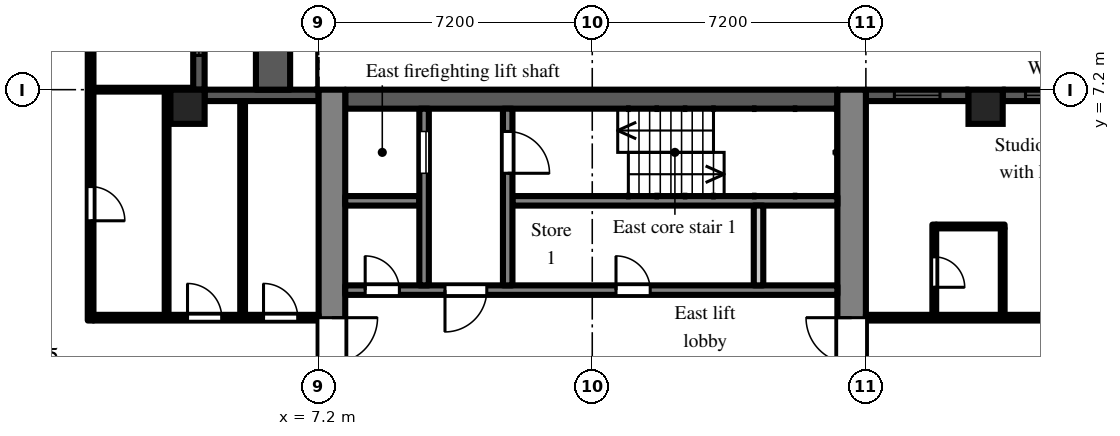
"""IFC4 building model, lengths in metres.
Left out: names, types, materials, properties, quantities, classifications, styles, units other than length and angle.
Written with IfcOpenShell. Run it as: python <this file> out.ifc"""

import sys

from ifc_helpers import new_model, si_unit, direction, frame, frame_2d, origin, origin_2d, place, context, subcontext, project, spatial, rectangle, extrude, element, fill, save


model = new_model("IFC4")
c1 = context("Model", 3, precision=1e-05, world=origin(), true_north=direction((0.0, 1.0)))
c2 = subcontext(c1, "Body", "Model", "MODEL_VIEW")
j1 = project(units=[si_unit("LENGTHUNIT", "METRE"), si_unit("PLANEANGLEUNIT", "RADIAN")], contexts=[c1])
p1 = place(None, origin())
s1 = spatial("IfcSite", under=j1, at=p1, CompositionType="ELEMENT")
p2 = place(p1, origin())
s2 = spatial("IfcBuilding", under=s1, at=p2, CompositionType="ELEMENT")
p3 = place(p2, frame((0.0, 0.0, 93.9)))
s3 = spatial("IfcBuildingStorey", under=s2, at=p3, CompositionType="ELEMENT", Elevation=93.9)
for number, where, z_axis, x_axis in (
    (1, (3.75, 6.75, 0.0), (0.0, 0.0, 1.0), (1.0, 0.0, 0.0)),
    (2, (24.75, 6.75, 0.0), (0.0, 0.0, 1.0), (1.0, 0.0, 0.0)),
):
    element("IfcColumn", number, at=place(p3, frame(where, z_axis=z_axis, x_axis=x_axis)), inside=s3, PredefinedType="COLUMN", context=c2, shape_type="SweptSolid", body=[
        extrude(rectangle(XDim=0.9, YDim=0.9, at=origin_2d()), origin(), (0.0, 0.0, 1.0), 3.0),
    ])
p4 = place(p3, frame((28.35, 7.05, 0.0), z_axis=(0.0, 0.0, 1.0), x_axis=(-1.0, 0.0, 0.0)))
e3 = element("IfcWall", 3, at=p4, inside=s3, PredefinedType="SOLIDWALL", context=c2, shape_type="SweptSolid", body=[
    extrude(rectangle(XDim=3.15, YDim=0.3, at=frame_2d((1.575, 0.0))), origin(), (0.0, 0.0, 1.0), 2.1),
])
p5 = place(p4, frame((0.15, 0.0, 0.2)))
e4 = element("IfcOpeningElement", 4, at=p5, cuts=e3, PredefinedType="OPENING", context=c2, shape_type="SweptSolid", body=[
    extrude(rectangle(XDim=2.4, YDim=1.85, at=frame_2d((1.2, 0.925))), frame((0.0, 0.16, 0.0), z_axis=(0.0, -1.0, 0.0), x_axis=(1.0, 0.0, 0.0)), (0.0, 0.0, 1.0), 0.32),
])
p6 = place(p3, frame((24.3, 7.05, 0.0), z_axis=(0.0, 0.0, 1.0), x_axis=(-1.0, 0.0, 0.0)))
e5 = element("IfcWall", 5, at=p6, inside=s3, PredefinedType="SOLIDWALL", context=c2, shape_type="SweptSolid", body=[
    extrude(rectangle(XDim=2.7, YDim=0.3, at=frame_2d((1.35, 0.0))), origin(), (0.0, 0.0, 1.0), 2.1),
])
p7 = place(p6, frame((0.75, 0.0, 0.2)))
e6 = element("IfcOpeningElement", 6, at=p7, cuts=e5, PredefinedType="OPENING", context=c2, shape_type="SweptSolid", body=[
    extrude(rectangle(XDim=1.2, YDim=1.85, at=frame_2d((0.6, 0.925))), frame((0.0, 0.16, 0.0), z_axis=(0.0, -1.0, 0.0), x_axis=(1.0, 0.0, 0.0)), (0.0, 0.0, 1.0), 0.32),
])
p8 = place(p3, frame((7.2, 7.05, 0.0), z_axis=(0.0, 0.0, 1.0), x_axis=(-1.0, 0.0, 0.0)))
e7 = element("IfcWall", 7, at=p8, inside=s3, PredefinedType="SOLIDWALL", context=c2, shape_type="SweptSolid", body=[
    extrude(rectangle(XDim=3.0, YDim=0.3, at=frame_2d((1.5, 0.0))), origin(), (0.0, 0.0, 1.0), 2.1),
])
p9 = place(p3, frame((4.05, 7.2, 0.0), z_axis=(0.0, 0.0, 1.0), x_axis=(0.0, 1.0, 0.0)))
e8 = element("IfcWall", 8, at=p9, inside=s3, PredefinedType="SOLIDWALL", context=c2, shape_type="SweptSolid", body=[
    extrude(rectangle(XDim=7.2, YDim=0.3, at=frame_2d((3.6, 0.0))), origin(), (0.0, 0.0, 1.0), 2.1),
])
p10 = place(p9, frame((3.0, 0.0, 0.0)))
e9 = element("IfcOpeningElement", 9, at=p10, cuts=e8, PredefinedType="OPENING", context=c2, shape_type="SweptSolid", body=[
    extrude(rectangle(XDim=1.2, YDim=2.05, at=frame_2d((0.6, 1.025))), frame((0.0, 0.16, 0.0), z_axis=(0.0, -1.0, 0.0), x_axis=(1.0, 0.0, 0.0)), (0.0, 0.0, 1.0), 0.32),
])
p11 = place(p9, frame((0.9, 0.0, 0.2)))
e10 = element("IfcOpeningElement", 10, at=p11, cuts=e8, PredefinedType="OPENING", context=c2, shape_type="SweptSolid", body=[
    extrude(rectangle(XDim=1.8, YDim=1.85, at=frame_2d((0.9, 0.925))), frame((0.0, 0.16, 0.0), z_axis=(0.0, -1.0, 0.0), x_axis=(1.0, 0.0, 0.0)), (0.0, 0.0, 1.0), 0.32),
])
p12 = place(p9, frame((4.5, 0.0, 0.2)))
e11 = element("IfcOpeningElement", 11, at=p12, cuts=e8, PredefinedType="OPENING", context=c2, shape_type="SweptSolid", body=[
    extrude(rectangle(XDim=1.8, YDim=1.85, at=frame_2d((0.9, 0.925))), frame((0.0, 0.16, 0.0), z_axis=(0.0, -1.0, 0.0), x_axis=(1.0, 0.0, 0.0)), (0.0, 0.0, 1.0), 0.32),
])
p13 = place(p3, frame((6.0, 7.2, 0.0), z_axis=(0.0, 0.0, 1.0), x_axis=(0.0, 1.0, 0.0)))
e12 = element("IfcWall", 12, at=p13, inside=s3, PredefinedType="PARAPET", context=c2, shape_type="SweptSolid", body=[
    extrude(rectangle(XDim=7.2, YDim=0.9, at=frame_2d((3.6, 0.0))), origin(), (0.0, 0.0, 1.0), 0.8),
])
p14 = place(p3, frame((7.55, -7.2, 0.0), z_axis=(0.0, 0.0, 1.0), x_axis=(0.0, 1.0, 0.0)))
e13 = element("IfcWall", 13, at=p14, inside=s3, PredefinedType="SHEAR", context=c2, shape_type="SweptSolid", body=[
    extrude(rectangle(XDim=14.4, YDim=0.7, at=frame_2d((7.2, 0.0))), origin(), (0.0, 0.0, 1.0), 2.575),
])
p15 = place(p14, frame((6.0, 0.0, 0.0)))
e14 = element("IfcOpeningElement", 14, at=p15, cuts=e13, PredefinedType="OPENING", context=c2, shape_type="SweptSolid", body=[
    extrude(rectangle(XDim=2.4, YDim=2.2, at=frame_2d((1.2, 1.1))), frame((0.0, 0.36, 0.0), z_axis=(0.0, -1.0, 0.0), x_axis=(1.0, 0.0, 0.0)), (0.0, 0.0, 1.0), 0.72),
])
p16 = place(p3, frame((21.225, -7.2, 0.0), z_axis=(0.0, 0.0, 1.0), x_axis=(0.0, 1.0, 0.0)))
e15 = element("IfcWall", 15, at=p16, inside=s3, PredefinedType="SHEAR", context=c2, shape_type="SweptSolid", body=[
    extrude(rectangle(XDim=14.4, YDim=0.75, at=frame_2d((7.2, 0.0))), origin(), (0.0, 0.0, 1.0), 2.575),
])
p17 = place(p16, frame((6.0, 0.0, 0.0)))
e16 = element("IfcOpeningElement", 16, at=p17, cuts=e15, PredefinedType="OPENING", context=c2, shape_type="SweptSolid", body=[
    extrude(rectangle(XDim=2.4, YDim=2.2, at=frame_2d((1.2, 1.1))), frame((0.0, 0.385, 0.0), z_axis=(0.0, -1.0, 0.0), x_axis=(1.0, 0.0, 0.0)), (0.0, 0.0, 1.0), 0.77),
])
p18 = place(p3, frame((7.9, 6.95, 0.0), z_axis=(0.0, 0.0, 1.0), x_axis=(1.0, 0.0, 0.0)))
e17 = element("IfcWall", 17, at=p18, inside=s3, PredefinedType="SHEAR", context=c2, shape_type="SweptSolid", body=[
    extrude(rectangle(XDim=12.95, YDim=0.5, at=frame_2d((6.475, 0.0))), origin(), (0.0, 0.0, 1.0), 2.575),
])
p19 = place(p3, frame((7.9, 1.925, 0.0), z_axis=(0.0, 0.0, 1.0), x_axis=(1.0, 0.0, 0.0)))
e18 = element("IfcWall", 18, at=p19, inside=s3, PredefinedType="SHEAR", context=c2, shape_type="SweptSolid", body=[
    extrude(rectangle(XDim=12.95, YDim=0.25, at=frame_2d((6.475, 0.0))), origin(), (0.0, 0.0, 1.0), 2.575),
])
p20 = place(p19, frame((0.525, 0.0, 0.0)))
e19 = element("IfcOpeningElement", 19, at=p20, cuts=e18, PredefinedType="OPENING", context=c2, shape_type="SweptSolid", body=[
    extrude(rectangle(XDim=0.9, YDim=2.1, at=frame_2d((0.45, 1.05))), frame((0.0, 0.135, 0.0), z_axis=(0.0, -1.0, 0.0), x_axis=(1.0, 0.0, 0.0)), (0.0, 0.0, 1.0), 0.27),
])
p21 = place(p19, frame((2.625, 0.0, 0.0)))
e20 = element("IfcOpeningElement", 20, at=p21, cuts=e18, PredefinedType="OPENING", context=c2, shape_type="SweptSolid", body=[
    extrude(rectangle(XDim=1.1, YDim=2.1, at=frame_2d((0.55, 1.05))), frame((0.0, 0.135, 0.0), z_axis=(0.0, -1.0, 0.0), x_axis=(1.0, 0.0, 0.0)), (0.0, 0.0, 1.0), 0.27),
])
p22 = place(p19, frame((7.125, 0.0, 0.0)))
e21 = element("IfcOpeningElement", 21, at=p22, cuts=e18, PredefinedType="OPENING", context=c2, shape_type="SweptSolid", body=[
    extrude(rectangle(XDim=0.9, YDim=2.1, at=frame_2d((0.45, 1.05))), frame((0.0, 0.135, 0.0), z_axis=(0.0, -1.0, 0.0), x_axis=(1.0, 0.0, 0.0)), (0.0, 0.0, 1.0), 0.27),
])
p23 = place(p3, frame((7.9, 4.275, 0.0), z_axis=(0.0, 0.0, 1.0), x_axis=(1.0, 0.0, 0.0)))
e22 = element("IfcWall", 22, at=p23, inside=s3, PredefinedType="SHEAR", context=c2, shape_type="SweptSolid", body=[
    extrude(rectangle(XDim=1.95, YDim=0.25, at=frame_2d((0.975, 0.0))), origin(), (0.0, 0.0, 1.0), 2.575),
])
p24 = place(p3, frame((12.3, 4.275, 0.0), z_axis=(0.0, 0.0, 1.0), x_axis=(1.0, 0.0, 0.0)))
e23 = element("IfcWall", 23, at=p24, inside=s3, PredefinedType="SHEAR", context=c2, shape_type="SweptSolid", body=[
    extrude(rectangle(XDim=8.55, YDim=0.25, at=frame_2d((4.275, 0.0))), origin(), (0.0, 0.0, 1.0), 2.575),
])
p25 = place(p3, frame((9.975, 2.05, 0.0), z_axis=(0.0, 0.0, 1.0), x_axis=(0.0, 1.0, 0.0)))
e24 = element("IfcWall", 24, at=p25, inside=s3, PredefinedType="SHEAR", context=c2, shape_type="SweptSolid", body=[
    extrude(rectangle(XDim=4.65, YDim=0.25, at=frame_2d((2.325, 0.0))), origin(), (0.0, 0.0, 1.0), 2.575),
])
p26 = place(p25, frame((2.95, 0.0, 0.0)))
e25 = element("IfcOpeningElement", 25, at=p26, cuts=e24, PredefinedType="OPENING", context=c2, shape_type="SweptSolid", body=[
    extrude(rectangle(XDim=1.1, YDim=2.1, at=frame_2d((0.55, 1.05))), frame((0.0, 0.135, 0.0), z_axis=(0.0, -1.0, 0.0), x_axis=(1.0, 0.0, 0.0)), (0.0, 0.0, 1.0), 0.27),
])
p27 = place(p3, frame((12.175, 2.05, 0.0), z_axis=(0.0, 0.0, 1.0), x_axis=(0.0, 1.0, 0.0)))
e26 = element("IfcWall", 26, at=p27, inside=s3, PredefinedType="SHEAR", context=c2, shape_type="SweptSolid", body=[
    extrude(rectangle(XDim=4.65, YDim=0.25, at=frame_2d((2.325, 0.0))), origin(), (0.0, 0.0, 1.0), 2.575),
])
p28 = place(p27, frame((2.95, 0.0, 0.0)))
e27 = element("IfcOpeningElement", 27, at=p28, cuts=e26, PredefinedType="OPENING", context=c2, shape_type="SweptSolid", body=[
    extrude(rectangle(XDim=1.1, YDim=2.1, at=frame_2d((0.55, 1.05))), frame((0.0, 0.135, 0.0), z_axis=(0.0, -1.0, 0.0), x_axis=(1.0, 0.0, 0.0)), (0.0, 0.0, 1.0), 0.27),
])
p29 = place(p3, frame((18.775, 2.05, 0.0), z_axis=(0.0, 0.0, 1.0), x_axis=(0.0, 1.0, 0.0)))
e28 = element("IfcWall", 28, at=p29, inside=s3, PredefinedType="PARTITIONING", context=c2, shape_type="SweptSolid", body=[
    extrude(rectangle(XDim=2.1, YDim=0.25, at=frame_2d((1.05, 0.0))), origin(), (0.0, 0.0, 1.0), 2.575),
])
p30 = place(p3, frame((1.2, 1.125, 0.0), z_axis=(0.0, 0.0, 1.0), x_axis=(0.0, 1.0, 0.0)))
e29 = element("IfcWall", 29, at=p30, inside=s3, PredefinedType="PARTITIONING", context=c2, shape_type="SweptSolid", body=[
    extrude(rectangle(XDim=20.175, YDim=0.15, at=frame_2d((10.087, 0.0))), origin(), (0.0, 0.0, 1.0), 2.575),
])
p31 = place(p30, frame((2.625, 0.0, 0.0)))
e30 = element("IfcOpeningElement", 30, at=p31, cuts=e29, PredefinedType="OPENING", context=c2, shape_type="SweptSolid", body=[
    extrude(rectangle(XDim=0.9, YDim=2.1, at=frame_2d((0.45, 1.05))), frame((0.0, 0.085, 0.0), z_axis=(0.0, -1.0, 0.0), x_axis=(1.0, 0.0, 0.0)), (0.0, 0.0, 1.0), 0.17),
])
p32 = place(p30, frame((7.425, 0.0, 0.0)))
e31 = element("IfcOpeningElement", 31, at=p32, cuts=e29, PredefinedType="OPENING", context=c2, shape_type="SweptSolid", body=[
    extrude(rectangle(XDim=0.9, YDim=2.1, at=frame_2d((0.45, 1.05))), frame((0.0, 0.085, 0.0), z_axis=(0.0, -1.0, 0.0), x_axis=(1.0, 0.0, 0.0)), (0.0, 0.0, 1.0), 0.17),
])
p33 = place(p30, frame((13.725, 0.0, 0.0)))
e32 = element("IfcOpeningElement", 32, at=p33, cuts=e29, PredefinedType="OPENING", context=c2, shape_type="SweptSolid", body=[
    extrude(rectangle(XDim=0.9, YDim=2.1, at=frame_2d((0.45, 1.05))), frame((0.0, 0.085, 0.0), z_axis=(0.0, -1.0, 0.0), x_axis=(1.0, 0.0, 0.0)), (0.0, 0.0, 1.0), 0.17),
])
p34 = place(p30, frame((15.525, 0.0, 0.0)))
e33 = element("IfcOpeningElement", 33, at=p34, cuts=e29, PredefinedType="OPENING", context=c2, shape_type="SweptSolid", body=[
    extrude(rectangle(XDim=0.9, YDim=2.1, at=frame_2d((0.45, 1.05))), frame((0.0, 0.085, 0.0), z_axis=(0.0, -1.0, 0.0), x_axis=(1.0, 0.0, 0.0)), (0.0, 0.0, 1.0), 0.17),
])
p35 = place(p30, frame((18.075, 0.0, 0.0)))
e34 = element("IfcOpeningElement", 34, at=p35, cuts=e29, PredefinedType="OPENING", context=c2, shape_type="SweptSolid", body=[
    extrude(rectangle(XDim=0.9, YDim=2.1, at=frame_2d((0.45, 1.05))), frame((0.0, 0.085, 0.0), z_axis=(0.0, -1.0, 0.0), x_axis=(1.0, 0.0, 0.0)), (0.0, 0.0, 1.0), 0.17),
])
p36 = place(p3, frame((1.275, 1.2, 0.0), z_axis=(0.0, 0.0, 1.0), x_axis=(1.0, 0.0, 0.0)))
e35 = element("IfcWall", 35, at=p36, inside=s3, PredefinedType="PARTITIONING", context=c2, shape_type="SweptSolid", body=[
    extrude(rectangle(XDim=5.925, YDim=0.15, at=frame_2d((2.962, 0.0))), origin(), (0.0, 0.0, 1.0), 2.575),
])
p37 = place(p36, frame((2.475, 0.0, 0.0)))
e36 = element("IfcOpeningElement", 36, at=p37, cuts=e35, PredefinedType="OPENING", context=c2, shape_type="SweptSolid", body=[
    extrude(rectangle(XDim=0.9, YDim=2.1, at=frame_2d((0.45, 1.05))), frame((0.0, 0.085, 0.0), z_axis=(0.0, -1.0, 0.0), x_axis=(1.0, 0.0, 0.0)), (0.0, 0.0, 1.0), 0.17),
])
p38 = place(p36, frame((4.475, 0.0, 0.0)))
e37 = element("IfcOpeningElement", 37, at=p38, cuts=e35, PredefinedType="OPENING", context=c2, shape_type="SweptSolid", body=[
    extrude(rectangle(XDim=0.9, YDim=2.1, at=frame_2d((0.45, 1.05))), frame((0.0, 0.085, 0.0), z_axis=(0.0, -1.0, 0.0), x_axis=(1.0, 0.0, 0.0)), (0.0, 0.0, 1.0), 0.17),
])
p39 = place(p3, frame((1.275, 7.2, 0.0), z_axis=(0.0, 0.0, 1.0), x_axis=(1.0, 0.0, 0.0)))
e38 = element("IfcWall", 38, at=p39, inside=s3, PredefinedType="PARTITIONING", context=c2, shape_type="SweptSolid", body=[
    extrude(rectangle(XDim=2.625, YDim=0.1, at=frame_2d((1.312, 0.0))), origin(), (0.0, 0.0, 1.0), 2.575),
])
p40 = place(p3, frame((3.2, 1.275, 0.0), z_axis=(0.0, 0.0, 1.0), x_axis=(0.0, 1.0, 0.0)))
e39 = element("IfcWall", 39, at=p40, inside=s3, PredefinedType="PARTITIONING", context=c2, shape_type="SweptSolid", body=[
    extrude(rectangle(XDim=5.875, YDim=0.1, at=frame_2d((2.938, 0.0))), origin(), (0.0, 0.0, 1.0), 2.575),
])
p41 = place(p3, frame((5.2, 1.275, 0.0), z_axis=(0.0, 0.0, 1.0), x_axis=(0.0, 1.0, 0.0)))
e40 = element("IfcWall", 40, at=p41, inside=s3, PredefinedType="PARTITIONING", context=c2, shape_type="SweptSolid", body=[
    extrude(rectangle(XDim=5.625, YDim=0.125, at=frame_2d((2.812, 0.0))), origin(), (0.0, 0.0, 1.0), 2.575),
])
p42 = place(p3, frame((21.6, 1.2, 0.0), z_axis=(0.0, 0.0, 1.0), x_axis=(1.0, 0.0, 0.0)))
e41 = element("IfcWall", 41, at=p42, inside=s3, PredefinedType="PARTITIONING", context=c2, shape_type="SweptSolid", body=[
    extrude(rectangle(XDim=14.9, YDim=0.15, at=frame_2d((7.45, 0.0))), origin(), (0.0, 0.0, 1.0), 2.575),
])
p43 = place(p42, frame((6.0, 0.0, 0.0)))
e42 = element("IfcOpeningElement", 42, at=p43, cuts=e41, PredefinedType="OPENING", context=c2, shape_type="SweptSolid", body=[
    extrude(rectangle(XDim=1.0, YDim=2.1, at=frame_2d((0.5, 1.05))), frame((0.0, 0.085, 0.0), z_axis=(0.0, -1.0, 0.0), x_axis=(1.0, 0.0, 0.0)), (0.0, 0.0, 1.0), 0.17),
])
p44 = place(p42, frame((7.65, 0.0, 0.0)))
e43 = element("IfcOpeningElement", 43, at=p44, cuts=e41, PredefinedType="OPENING", context=c2, shape_type="SweptSolid", body=[
    extrude(rectangle(XDim=0.9, YDim=2.1, at=frame_2d((0.45, 1.05))), frame((0.0, 0.085, 0.0), z_axis=(0.0, -1.0, 0.0), x_axis=(1.0, 0.0, 0.0)), (0.0, 0.0, 1.0), 0.17),
])
p45 = place(p42, frame((9.45, 0.0, 0.0)))
e44 = element("IfcOpeningElement", 44, at=p45, cuts=e41, PredefinedType="OPENING", context=c2, shape_type="SweptSolid", body=[
    extrude(rectangle(XDim=0.9, YDim=2.1, at=frame_2d((0.45, 1.05))), frame((0.0, 0.085, 0.0), z_axis=(0.0, -1.0, 0.0), x_axis=(1.0, 0.0, 0.0)), (0.0, 0.0, 1.0), 0.17),
])
p46 = place(p42, frame((11.95, 0.0, 0.0)))
e45 = element("IfcOpeningElement", 45, at=p46, cuts=e41, PredefinedType="OPENING", context=c2, shape_type="SweptSolid", body=[
    extrude(rectangle(XDim=1.8, YDim=2.1, at=frame_2d((0.9, 1.05))), frame((0.0, 0.085, 0.0), z_axis=(0.0, -1.0, 0.0), x_axis=(1.0, 0.0, 0.0)), (0.0, 0.0, 1.0), 0.17),
])
p47 = place(p3, frame((23.4, 1.275, 0.0), z_axis=(0.0, 0.0, 1.0), x_axis=(0.0, 1.0, 0.0)))
e46 = element("IfcWall", 46, at=p47, inside=s3, PredefinedType="PARTITIONING", context=c2, shape_type="SweptSolid", body=[
    extrude(rectangle(XDim=2.375, YDim=0.1, at=frame_2d((1.188, 0.0))), origin(), (0.0, 0.0, 1.0), 2.575),
])
p48 = place(p47, frame((0.725, 0.0, 0.0)))
e47 = element("IfcOpeningElement", 47, at=p48, cuts=e46, PredefinedType="OPENING", context=c2, shape_type="SweptSolid", body=[
    extrude(rectangle(XDim=0.8, YDim=2.1, at=frame_2d((0.4, 1.05))), frame((0.0, 0.06, 0.0), z_axis=(0.0, -1.0, 0.0), x_axis=(1.0, 0.0, 0.0)), (0.0, 0.0, 1.0), 0.12),
])
p49 = place(p3, frame((23.45, 3.6, 0.0), z_axis=(0.0, 0.0, 1.0), x_axis=(1.0, 0.0, 0.0)))
e48 = element("IfcWall", 48, at=p49, inside=s3, PredefinedType="PARTITIONING", context=c2, shape_type="SweptSolid", body=[
    extrude(rectangle(XDim=1.8, YDim=0.1, at=frame_2d((0.9, 0.0))), origin(), (0.0, 0.0, 1.0), 2.575),
])
p50 = place(p3, frame((25.2, 1.275, 0.0), z_axis=(0.0, 0.0, 1.0), x_axis=(0.0, 1.0, 0.0)))
e49 = element("IfcWall", 49, at=p50, inside=s3, PredefinedType="PARTITIONING", context=c2, shape_type="SweptSolid", body=[
    extrude(rectangle(XDim=2.275, YDim=0.1, at=frame_2d((1.138, 0.0))), origin(), (0.0, 0.0, 1.0), 2.575),
])
p51 = place(p5, origin())
e50 = element("IfcWindow", 50, at=p51, inside=s3, PartitioningType="SINGLE_PANEL", PredefinedType="WINDOW", context=c2, shape_type="SweptSolid", body=[
    extrude(rectangle(XDim=2.4, YDim=1.85, at=frame_2d((1.2, 0.925))), frame((0.0, 0.03, 0.0), z_axis=(0.0, -1.0, 0.0), x_axis=(1.0, 0.0, 0.0)), (0.0, 0.0, 1.0), 0.06),
])
fill(e4, e50)
p52 = place(p7, origin())
e51 = element("IfcWindow", 51, at=p52, inside=s3, PartitioningType="SINGLE_PANEL", PredefinedType="WINDOW", context=c2, shape_type="SweptSolid", body=[
    extrude(rectangle(XDim=1.2, YDim=1.85, at=frame_2d((0.6, 0.925))), frame((0.0, 0.03, 0.0), z_axis=(0.0, -1.0, 0.0), x_axis=(1.0, 0.0, 0.0)), (0.0, 0.0, 1.0), 0.06),
])
fill(e6, e51)
p53 = place(p11, origin())
e52 = element("IfcWindow", 52, at=p53, inside=s3, PartitioningType="SINGLE_PANEL", PredefinedType="WINDOW", context=c2, shape_type="SweptSolid", body=[
    extrude(rectangle(XDim=1.8, YDim=1.85, at=frame_2d((0.9, 0.925))), frame((0.0, 0.03, 0.0), z_axis=(0.0, -1.0, 0.0), x_axis=(1.0, 0.0, 0.0)), (0.0, 0.0, 1.0), 0.06),
])
fill(e10, e52)
p54 = place(p26, origin())
e53 = element("IfcDoor", 53, at=p54, inside=s3, OperationType="SLIDING_TO_LEFT", PredefinedType="DOOR", context=c2, shape_type="SweptSolid", body=[
    extrude(rectangle(XDim=1.1, YDim=2.1, at=frame_2d((0.55, 1.05))), frame((0.0, 0.025, 0.0), z_axis=(0.0, -1.0, 0.0), x_axis=(1.0, 0.0, 0.0)), (0.0, 0.0, 1.0), 0.05),
])
fill(e25, e53)
p55 = place(p28, frame((1.1, 0.0, 0.0), z_axis=(0.0, 0.0, 1.0), x_axis=(-1.0, 0.0, 0.0)))
e54 = element("IfcDoor", 54, at=p55, inside=s3, OperationType="SINGLE_SWING_RIGHT", PredefinedType="DOOR", context=c2, shape_type="SweptSolid", body=[
    extrude(rectangle(XDim=1.1, YDim=2.1, at=frame_2d((0.55, 1.05))), frame((0.0, 0.025, 0.0), z_axis=(0.0, -1.0, 0.0), x_axis=(1.0, 0.0, 0.0)), (0.0, 0.0, 1.0), 0.05),
])
fill(e27, e54)
p56 = place(p20, origin())
e55 = element("IfcDoor", 55, at=p56, inside=s3, OperationType="SINGLE_SWING_LEFT", PredefinedType="DOOR", context=c2, shape_type="SweptSolid", body=[
    extrude(rectangle(XDim=0.9, YDim=2.1, at=frame_2d((0.45, 1.05))), frame((0.0, 0.025, 0.0), z_axis=(0.0, -1.0, 0.0), x_axis=(1.0, 0.0, 0.0)), (0.0, 0.0, 1.0), 0.05),
])
fill(e19, e55)
p57 = place(p21, frame((1.1, 0.0, 0.0), z_axis=(0.0, 0.0, 1.0), x_axis=(-1.0, 0.0, 0.0)))
e56 = element("IfcDoor", 56, at=p57, inside=s3, OperationType="SINGLE_SWING_RIGHT", PredefinedType="DOOR", context=c2, shape_type="SweptSolid", body=[
    extrude(rectangle(XDim=1.1, YDim=2.1, at=frame_2d((0.55, 1.05))), frame((0.0, 0.025, 0.0), z_axis=(0.0, -1.0, 0.0), x_axis=(1.0, 0.0, 0.0)), (0.0, 0.0, 1.0), 0.05),
])
fill(e20, e56)
p58 = place(p15, frame((2.4, 0.0, 0.0), z_axis=(0.0, 0.0, 1.0), x_axis=(-1.0, 0.0, 0.0)))
e57 = element("IfcDoor", 57, at=p58, inside=s3, OperationType="DOUBLE_DOOR_DOUBLE_SWING", PredefinedType="DOOR", context=c2, shape_type="SweptSolid", body=[
    extrude(rectangle(XDim=2.4, YDim=2.2, at=frame_2d((1.2, 1.1))), frame((0.0, 0.025, 0.0), z_axis=(0.0, -1.0, 0.0), x_axis=(1.0, 0.0, 0.0)), (0.0, 0.0, 1.0), 0.05),
])
fill(e14, e57)
p59 = place(p17, origin())
e58 = element("IfcDoor", 58, at=p59, inside=s3, OperationType="DOUBLE_DOOR_DOUBLE_SWING", PredefinedType="DOOR", context=c2, shape_type="SweptSolid", body=[
    extrude(rectangle(XDim=2.4, YDim=2.2, at=frame_2d((1.2, 1.1))), frame((0.0, 0.025, 0.0), z_axis=(0.0, -1.0, 0.0), x_axis=(1.0, 0.0, 0.0)), (0.0, 0.0, 1.0), 0.05),
])
fill(e16, e58)
p60 = place(p22, origin())
e59 = element("IfcDoor", 59, at=p60, inside=s3, OperationType="SINGLE_SWING_LEFT", PredefinedType="DOOR", context=c2, shape_type="SweptSolid", body=[
    extrude(rectangle(XDim=0.9, YDim=2.1, at=frame_2d((0.45, 1.05))), frame((0.0, 0.025, 0.0), z_axis=(0.0, -1.0, 0.0), x_axis=(1.0, 0.0, 0.0)), (0.0, 0.0, 1.0), 0.05),
])
fill(e21, e59)
p61 = place(p31, frame((0.9, 0.0, 0.0), z_axis=(0.0, 0.0, 1.0), x_axis=(-1.0, 0.0, 0.0)))
e60 = element("IfcDoor", 60, at=p61, inside=s3, OperationType="SINGLE_SWING_RIGHT", PredefinedType="DOOR", context=c2, shape_type="SweptSolid", body=[
    extrude(rectangle(XDim=0.9, YDim=2.1, at=frame_2d((0.45, 1.05))), frame((0.0, 0.025, 0.0), z_axis=(0.0, -1.0, 0.0), x_axis=(1.0, 0.0, 0.0)), (0.0, 0.0, 1.0), 0.05),
])
fill(e30, e60)
p62 = place(p37, origin())
e61 = element("IfcDoor", 61, at=p62, inside=s3, OperationType="SINGLE_SWING_LEFT", PredefinedType="DOOR", context=c2, shape_type="SweptSolid", body=[
    extrude(rectangle(XDim=0.9, YDim=2.1, at=frame_2d((0.45, 1.05))), frame((0.0, 0.025, 0.0), z_axis=(0.0, -1.0, 0.0), x_axis=(1.0, 0.0, 0.0)), (0.0, 0.0, 1.0), 0.05),
])
fill(e36, e61)
p63 = place(p38, origin())
e62 = element("IfcDoor", 62, at=p63, inside=s3, OperationType="SINGLE_SWING_LEFT", PredefinedType="DOOR", context=c2, shape_type="SweptSolid", body=[
    extrude(rectangle(XDim=0.9, YDim=2.1, at=frame_2d((0.45, 1.05))), frame((0.0, 0.025, 0.0), z_axis=(0.0, -1.0, 0.0), x_axis=(1.0, 0.0, 0.0)), (0.0, 0.0, 1.0), 0.05),
])
fill(e37, e62)
p64 = place(p48, frame((0.8, 0.0, 0.0), z_axis=(0.0, 0.0, 1.0), x_axis=(-1.0, 0.0, 0.0)))
e63 = element("IfcDoor", 63, at=p64, inside=s3, OperationType="SINGLE_SWING_RIGHT", PredefinedType="DOOR", context=c2, shape_type="SweptSolid", body=[
    extrude(rectangle(XDim=0.8, YDim=2.1, at=frame_2d((0.4, 1.05))), frame((0.0, 0.025, 0.0), z_axis=(0.0, -1.0, 0.0), x_axis=(1.0, 0.0, 0.0)), (0.0, 0.0, 1.0), 0.05),
])
fill(e47, e63)
save(model, sys.argv[1])
